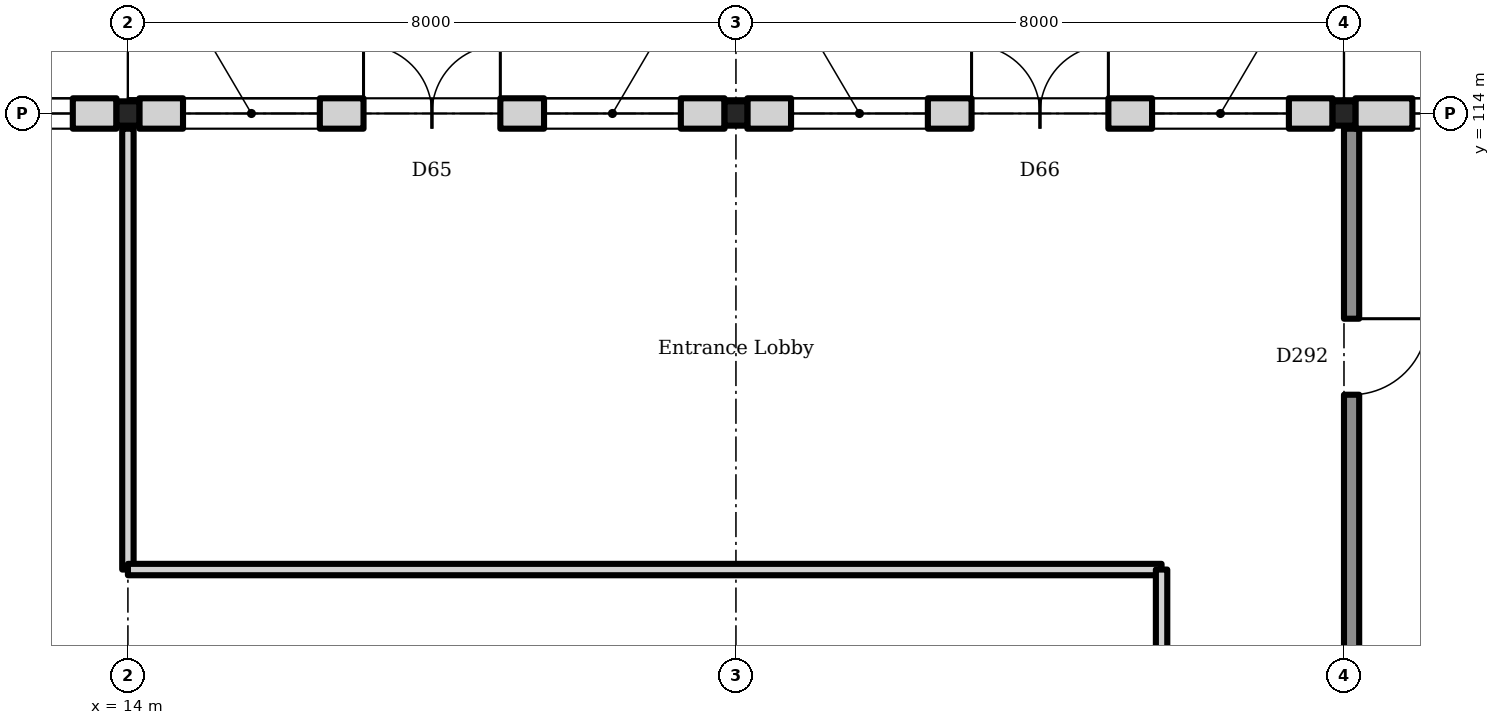
"""IFC4 building model, lengths in metres.
Left out: names, types, materials, properties, quantities, classifications, styles, units other than length and angle.
Written with IfcOpenShell. Run it as: python <this file> out.ifc"""

import sys

from ifc_helpers import new_model, si_unit, direction, frame, frame_2d, origin, origin_2d, place, context, subcontext, project, spatial, rectangle, i_section, extrude, element, fill, save


model = new_model("IFC4")
c1 = context("Model", 3, precision=1e-05, world=origin(), true_north=direction((0.0, 1.0)))
c2 = subcontext(c1, "Body", "Model", "MODEL_VIEW")
j1 = project(units=[si_unit("LENGTHUNIT", "METRE"), si_unit("PLANEANGLEUNIT", "RADIAN")], contexts=[c1])
p1 = place(None, origin())
s1 = spatial("IfcSite", under=j1, at=p1, CompositionType="ELEMENT")
p2 = place(p1, origin())
s2 = spatial("IfcBuilding", under=s1, at=p2, CompositionType="ELEMENT")
p3 = place(p2, origin())
s3 = spatial("IfcBuildingStorey", under=s2, at=p3, CompositionType="ELEMENT", Elevation=0.0)
for number, where, z_axis, x_axis in (
    (1, (14.0, 114.0, 0.0), (0.0, 0.0, 1.0), (1.0, 0.0, 0.0)),
    (2, (22.0, 114.0, 0.0), (0.0, 0.0, 1.0), (1.0, 0.0, 0.0)),
    (3, (30.0, 114.0, 0.0), (0.0, 0.0, 1.0), (1.0, 0.0, 0.0)),
):
    element("IfcColumn", number, at=place(p3, frame(where, z_axis=z_axis, x_axis=x_axis)), inside=s3, PredefinedType="COLUMN", context=c2, shape_type="SweptSolid", body=[
        extrude(i_section(OverallWidth=0.3, OverallDepth=0.32, WebThickness=0.011, FlangeThickness=0.021, FilletRadius=0.027, at=origin_2d()), origin(), (0.0, 0.0, 1.0), 5.4),
    ])
p4 = place(p3, frame((6.15, 114.0, -0.3), z_axis=(0.0, 0.0, 1.0), x_axis=(1.0, 0.0, 0.0)))
e4 = element("IfcWall", 4, at=p4, inside=s3, PredefinedType="SOLIDWALL", context=c2, shape_type="SweptSolid", body=[
    extrude(rectangle(XDim=7.7, YDim=0.4, at=frame_2d((3.85, 0.0))), origin(), (0.0, 0.0, 1.0), 5.13),
])
p5 = place(p4, frame((0.575, 0.0, 0.45)))
e5 = element("IfcOpeningElement", 5, at=p5, cuts=e4, PredefinedType="OPENING", context=c2, shape_type="SweptSolid", body=[
    extrude(rectangle(XDim=1.8, YDim=3.6, at=frame_2d((0.9, 1.8))), frame((0.0, 0.21, 0.0), z_axis=(0.0, -1.0, 0.0), x_axis=(1.0, 0.0, 0.0)), (0.0, 0.0, 1.0), 0.42),
])
p6 = place(p4, frame((2.95, 0.0, 0.45)))
e6 = element("IfcOpeningElement", 6, at=p6, cuts=e4, PredefinedType="OPENING", context=c2, shape_type="SweptSolid", body=[
    extrude(rectangle(XDim=1.8, YDim=3.6, at=frame_2d((0.9, 1.8))), frame((0.0, 0.21, 0.0), z_axis=(0.0, -1.0, 0.0), x_axis=(1.0, 0.0, 0.0)), (0.0, 0.0, 1.0), 0.42),
])
p7 = place(p4, frame((5.325, 0.0, 0.45)))
e7 = element("IfcOpeningElement", 7, at=p7, cuts=e4, PredefinedType="OPENING", context=c2, shape_type="SweptSolid", body=[
    extrude(rectangle(XDim=1.8, YDim=3.6, at=frame_2d((0.9, 1.8))), frame((0.0, 0.21, 0.0), z_axis=(0.0, -1.0, 0.0), x_axis=(1.0, 0.0, 0.0)), (0.0, 0.0, 1.0), 0.42),
])
p8 = place(p3, frame((14.15, 114.0, -0.3), z_axis=(0.0, 0.0, 1.0), x_axis=(1.0, 0.0, 0.0)))
e8 = element("IfcWall", 8, at=p8, inside=s3, PredefinedType="SOLIDWALL", context=c2, shape_type="SweptSolid", body=[
    extrude(rectangle(XDim=7.7, YDim=0.4, at=frame_2d((3.85, 0.0))), origin(), (0.0, 0.0, 1.0), 5.13),
])
p9 = place(p8, frame((0.575, 0.0, 0.45)))
e9 = element("IfcOpeningElement", 9, at=p9, cuts=e8, PredefinedType="OPENING", context=c2, shape_type="SweptSolid", body=[
    extrude(rectangle(XDim=1.8, YDim=3.6, at=frame_2d((0.9, 1.8))), frame((0.0, 0.21, 0.0), z_axis=(0.0, -1.0, 0.0), x_axis=(1.0, 0.0, 0.0)), (0.0, 0.0, 1.0), 0.42),
])
p10 = place(p8, frame((2.95, 0.0, 0.3)))
e10 = element("IfcOpeningElement", 10, at=p10, cuts=e8, PredefinedType="OPENING", context=c2, shape_type="SweptSolid", body=[
    extrude(rectangle(XDim=1.8, YDim=2.7, at=frame_2d((0.9, 1.35))), frame((0.0, 0.21, 0.0), z_axis=(0.0, -1.0, 0.0), x_axis=(1.0, 0.0, 0.0)), (0.0, 0.0, 1.0), 0.42),
])
p11 = place(p8, frame((5.325, 0.0, 0.45)))
e11 = element("IfcOpeningElement", 11, at=p11, cuts=e8, PredefinedType="OPENING", context=c2, shape_type="SweptSolid", body=[
    extrude(rectangle(XDim=1.8, YDim=3.6, at=frame_2d((0.9, 1.8))), frame((0.0, 0.21, 0.0), z_axis=(0.0, -1.0, 0.0), x_axis=(1.0, 0.0, 0.0)), (0.0, 0.0, 1.0), 0.42),
])
p12 = place(p3, frame((22.15, 114.0, -0.3), z_axis=(0.0, 0.0, 1.0), x_axis=(1.0, 0.0, 0.0)))
e12 = element("IfcWall", 12, at=p12, inside=s3, PredefinedType="SOLIDWALL", context=c2, shape_type="SweptSolid", body=[
    extrude(rectangle(XDim=7.7, YDim=0.4, at=frame_2d((3.85, 0.0))), origin(), (0.0, 0.0, 1.0), 5.13),
])
p13 = place(p12, frame((0.575, 0.0, 0.45)))
e13 = element("IfcOpeningElement", 13, at=p13, cuts=e12, PredefinedType="OPENING", context=c2, shape_type="SweptSolid", body=[
    extrude(rectangle(XDim=1.8, YDim=3.6, at=frame_2d((0.9, 1.8))), frame((0.0, 0.21, 0.0), z_axis=(0.0, -1.0, 0.0), x_axis=(1.0, 0.0, 0.0)), (0.0, 0.0, 1.0), 0.42),
])
p14 = place(p12, frame((2.95, 0.0, 0.3)))
e14 = element("IfcOpeningElement", 14, at=p14, cuts=e12, PredefinedType="OPENING", context=c2, shape_type="SweptSolid", body=[
    extrude(rectangle(XDim=1.8, YDim=2.7, at=frame_2d((0.9, 1.35))), frame((0.0, 0.21, 0.0), z_axis=(0.0, -1.0, 0.0), x_axis=(1.0, 0.0, 0.0)), (0.0, 0.0, 1.0), 0.42),
])
p15 = place(p12, frame((5.325, 0.0, 0.45)))
e15 = element("IfcOpeningElement", 15, at=p15, cuts=e12, PredefinedType="OPENING", context=c2, shape_type="SweptSolid", body=[
    extrude(rectangle(XDim=1.8, YDim=3.6, at=frame_2d((0.9, 1.8))), frame((0.0, 0.21, 0.0), z_axis=(0.0, -1.0, 0.0), x_axis=(1.0, 0.0, 0.0)), (0.0, 0.0, 1.0), 0.42),
])
p16 = place(p3, frame((30.15, 114.0, -0.3), z_axis=(0.0, 0.0, 1.0), x_axis=(1.0, 0.0, 0.0)))
e16 = element("IfcWall", 16, at=p16, inside=s3, PredefinedType="SOLIDWALL", context=c2, shape_type="SweptSolid", body=[
    extrude(rectangle(XDim=7.7, YDim=0.4, at=frame_2d((3.85, 0.0))), origin(), (0.0, 0.0, 1.0), 5.13),
])
p17 = place(p16, frame((5.25, 0.0, 0.3)))
e17 = element("IfcOpeningElement", 17, at=p17, cuts=e16, PredefinedType="OPENING", context=c2, shape_type="SweptSolid", body=[
    extrude(rectangle(XDim=1.2, YDim=2.4, at=frame_2d((0.6, 1.2))), frame((0.0, 0.21, 0.0), z_axis=(0.0, -1.0, 0.0), x_axis=(1.0, 0.0, 0.0)), (0.0, 0.0, 1.0), 0.42),
])
p18 = place(p16, frame((0.75, 0.0, 0.45)))
e18 = element("IfcOpeningElement", 18, at=p18, cuts=e16, PredefinedType="OPENING", context=c2, shape_type="SweptSolid", body=[
    extrude(rectangle(XDim=1.8, YDim=3.6, at=frame_2d((0.9, 1.8))), frame((0.0, 0.21, 0.0), z_axis=(0.0, -1.0, 0.0), x_axis=(1.0, 0.0, 0.0)), (0.0, 0.0, 1.0), 0.42),
])
p19 = place(p3, frame((30.1, 105.2, 0.0), z_axis=(0.0, 0.0, 1.0), x_axis=(0.0, 1.0, 0.0)))
e19 = element("IfcWall", 19, at=p19, inside=s3, PredefinedType="SOLIDWALL", context=c2, shape_type="SweptSolid", body=[
    extrude(rectangle(XDim=8.6, YDim=0.2, at=frame_2d((4.3, 0.0))), origin(), (0.0, 0.0, 1.0), 4.81),
])
p20 = place(p19, frame((5.1, 0.0, 0.0)))
e20 = element("IfcOpeningElement", 20, at=p20, cuts=e19, PredefinedType="OPENING", context=c2, shape_type="SweptSolid", body=[
    extrude(rectangle(XDim=1.0, YDim=2.1, at=frame_2d((0.5, 1.05))), frame((0.0, 0.11, 0.0), z_axis=(0.0, -1.0, 0.0), x_axis=(1.0, 0.0, 0.0)), (0.0, 0.0, 1.0), 0.22),
])
p21 = place(p3, frame((14.0, 108.0, 0.0), z_axis=(0.0, 0.0, 1.0), x_axis=(0.0, 1.0, 0.0)))
e21 = element("IfcWall", 21, at=p21, inside=s3, PredefinedType="PARTITIONING", context=c2, shape_type="SweptSolid", body=[
    extrude(rectangle(XDim=5.8, YDim=0.15, at=frame_2d((2.9, 0.0))), origin(), (0.0, 0.0, 1.0), 4.81),
])
p22 = place(p3, frame((14.0, 108.0, 0.0), z_axis=(0.0, 0.0, 1.0), x_axis=(1.0, 0.0, 0.0)))
e22 = element("IfcWall", 22, at=p22, inside=s3, PredefinedType="PARTITIONING", context=c2, shape_type="SweptSolid", body=[
    extrude(rectangle(XDim=13.6, YDim=0.15, at=frame_2d((6.8, 0.0))), origin(), (0.0, 0.0, 1.0), 4.81),
])
p23 = place(p3, frame((27.6, 101.4, 0.0), z_axis=(0.0, 0.0, 1.0), x_axis=(0.0, 1.0, 0.0)))
e23 = element("IfcWall", 23, at=p23, inside=s3, PredefinedType="PARTITIONING", context=c2, shape_type="SweptSolid", body=[
    extrude(rectangle(XDim=6.6, YDim=0.15, at=frame_2d((3.3, 0.0))), origin(), (0.0, 0.0, 1.0), 4.86),
])
p24 = place(p7, origin())
e24 = element("IfcWindow", 24, at=p24, inside=s3, PartitioningType="SINGLE_PANEL", PredefinedType="WINDOW", context=c2, shape_type="SweptSolid", body=[
    extrude(rectangle(XDim=1.8, YDim=3.6, at=frame_2d((0.9, 1.8))), frame((0.0, 0.03, 0.0), z_axis=(0.0, -1.0, 0.0), x_axis=(1.0, 0.0, 0.0)), (0.0, 0.0, 1.0), 0.06),
])
fill(e7, e24)
p25 = place(p9, origin())
e25 = element("IfcWindow", 25, at=p25, inside=s3, PartitioningType="SINGLE_PANEL", PredefinedType="WINDOW", context=c2, shape_type="SweptSolid", body=[
    extrude(rectangle(XDim=1.8, YDim=3.6, at=frame_2d((0.9, 1.8))), frame((0.0, 0.03, 0.0), z_axis=(0.0, -1.0, 0.0), x_axis=(1.0, 0.0, 0.0)), (0.0, 0.0, 1.0), 0.06),
])
fill(e9, e25)
p26 = place(p10, origin())
e26 = element("IfcDoor", 26, at=p26, inside=s3, OperationType="DOUBLE_DOOR_SINGLE_SWING", PredefinedType="DOOR", context=c2, shape_type="SweptSolid", body=[
    extrude(rectangle(XDim=1.8, YDim=2.7, at=frame_2d((0.9, 1.35))), frame((0.0, 0.025, 0.0), z_axis=(0.0, -1.0, 0.0), x_axis=(1.0, 0.0, 0.0)), (0.0, 0.0, 1.0), 0.05),
])
fill(e10, e26)
p27 = place(p11, origin())
e27 = element("IfcWindow", 27, at=p27, inside=s3, PartitioningType="SINGLE_PANEL", PredefinedType="WINDOW", context=c2, shape_type="SweptSolid", body=[
    extrude(rectangle(XDim=1.8, YDim=3.6, at=frame_2d((0.9, 1.8))), frame((0.0, 0.03, 0.0), z_axis=(0.0, -1.0, 0.0), x_axis=(1.0, 0.0, 0.0)), (0.0, 0.0, 1.0), 0.06),
])
fill(e11, e27)
p28 = place(p13, origin())
e28 = element("IfcWindow", 28, at=p28, inside=s3, PartitioningType="SINGLE_PANEL", PredefinedType="WINDOW", context=c2, shape_type="SweptSolid", body=[
    extrude(rectangle(XDim=1.8, YDim=3.6, at=frame_2d((0.9, 1.8))), frame((0.0, 0.03, 0.0), z_axis=(0.0, -1.0, 0.0), x_axis=(1.0, 0.0, 0.0)), (0.0, 0.0, 1.0), 0.06),
])
fill(e13, e28)
p29 = place(p14, origin())
e29 = element("IfcDoor", 29, at=p29, inside=s3, OperationType="DOUBLE_DOOR_SINGLE_SWING", PredefinedType="DOOR", context=c2, shape_type="SweptSolid", body=[
    extrude(rectangle(XDim=1.8, YDim=2.7, at=frame_2d((0.9, 1.35))), frame((0.0, 0.025, 0.0), z_axis=(0.0, -1.0, 0.0), x_axis=(1.0, 0.0, 0.0)), (0.0, 0.0, 1.0), 0.05),
])
fill(e14, e29)
p30 = place(p15, origin())
e30 = element("IfcWindow", 30, at=p30, inside=s3, PartitioningType="SINGLE_PANEL", PredefinedType="WINDOW", context=c2, shape_type="SweptSolid", body=[
    extrude(rectangle(XDim=1.8, YDim=3.6, at=frame_2d((0.9, 1.8))), frame((0.0, 0.03, 0.0), z_axis=(0.0, -1.0, 0.0), x_axis=(1.0, 0.0, 0.0)), (0.0, 0.0, 1.0), 0.06),
])
fill(e15, e30)
p31 = place(p18, origin())
e31 = element("IfcWindow", 31, at=p31, inside=s3, PartitioningType="SINGLE_PANEL", PredefinedType="WINDOW", context=c2, shape_type="SweptSolid", body=[
    extrude(rectangle(XDim=1.8, YDim=3.6, at=frame_2d((0.9, 1.8))), frame((0.0, 0.03, 0.0), z_axis=(0.0, -1.0, 0.0), x_axis=(1.0, 0.0, 0.0)), (0.0, 0.0, 1.0), 0.06),
])
fill(e18, e31)
p32 = place(p20, frame((1.0, 0.0, 0.0), z_axis=(0.0, 0.0, 1.0), x_axis=(-1.0, 0.0, 0.0)))
e32 = element("IfcDoor", 32, at=p32, inside=s3, OperationType="SINGLE_SWING_RIGHT", PredefinedType="DOOR", context=c2, shape_type="SweptSolid", body=[
    extrude(rectangle(XDim=1.0, YDim=2.1, at=frame_2d((0.5, 1.05))), frame((0.0, 0.025, 0.0), z_axis=(0.0, -1.0, 0.0), x_axis=(1.0, 0.0, 0.0)), (0.0, 0.0, 1.0), 0.05),
])
fill(e20, e32)
save(model, sys.argv[1])
